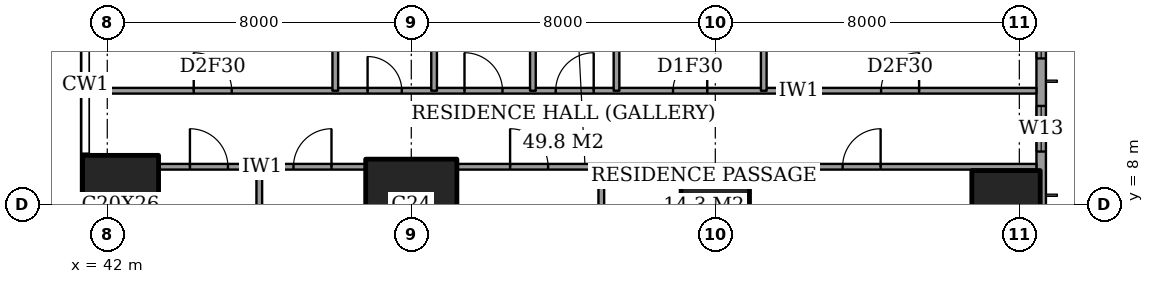
"""IFC4 building model, lengths in metres.
Left out: names, types, materials, properties, quantities, classifications, styles, units other than length and angle.
Written with IfcOpenShell. Run it as: python <this file> out.ifc"""

import sys

from ifc_helpers import new_model, si_unit, direction, frame, frame_2d, origin, origin_2d, place, context, subcontext, project, spatial, rectangle, extrude, element, fill, save


model = new_model("IFC4")
c1 = context("Model", 3, precision=1e-05, world=origin(), true_north=direction((0.0, 1.0)))
c2 = subcontext(c1, "Body", "Model", "MODEL_VIEW")
j1 = project(units=[si_unit("LENGTHUNIT", "METRE"), si_unit("PLANEANGLEUNIT", "RADIAN")], contexts=[c1])
p1 = place(None, origin())
s1 = spatial("IfcSite", under=j1, at=p1, CompositionType="ELEMENT")
p2 = place(p1, origin())
s2 = spatial("IfcBuilding", under=s1, at=p2, CompositionType="ELEMENT")
p3 = place(p2, frame((0.0, 0.0, 218.2)))
s3 = spatial("IfcBuildingStorey", under=s2, at=p3, CompositionType="ELEMENT", Elevation=218.2)
p4 = place(p3, frame((42.35, 8.0, 0.0), z_axis=(0.0, 0.0, 1.0), x_axis=(1.0, 0.0, 0.0)))
e1 = element("IfcColumn", 1, at=p4, inside=s3, PredefinedType="COLUMN", context=c2, shape_type="SweptSolid", body=[
    extrude(rectangle(XDim=2.0, YDim=2.6, at=origin_2d()), origin(), (0.0, 0.0, 1.0), 3.6),
])
p5 = place(p3, frame((50.0, 8.0, 0.0), z_axis=(0.0, 0.0, 1.0), x_axis=(1.0, 0.0, 0.0)))
e2 = element("IfcColumn", 2, at=p5, inside=s3, PredefinedType="COLUMN", context=c2, shape_type="SweptSolid", body=[
    extrude(rectangle(XDim=2.4, YDim=2.4, at=origin_2d()), origin(), (0.0, 0.0, 1.0), 3.6),
])
for number, where, z_axis, x_axis in (
    (3, (58.0, 8.0, 0.0), (0.0, 0.0, 1.0), (1.0, 0.0, 0.0)),
    (4, (65.65, 8.0, 0.0), (0.0, 0.0, 1.0), (1.0, 0.0, 0.0)),
):
    element("IfcColumn", number, at=place(p3, frame(where, z_axis=z_axis, x_axis=x_axis)), inside=s3, PredefinedType="COLUMN", context=c2, shape_type="SweptSolid", body=[
        extrude(rectangle(XDim=1.8, YDim=1.8, at=origin_2d()), origin(), (0.0, 0.0, 1.0), 3.6),
    ])
p6 = place(p3, frame((66.575, 3.175, 0.0), z_axis=(0.0, 0.0, 1.0), x_axis=(0.0, 1.0, 0.0)))
e5 = element("IfcWall", 5, at=p6, inside=s3, PredefinedType="SOLIDWALL", context=c2, shape_type="SweptSolid", body=[
    extrude(rectangle(XDim=41.65, YDim=0.25, at=frame_2d((20.825, 0.0))), origin(), (0.0, 0.0, 1.0), 3.6),
])
p7 = place(p6, frame((0.825, 0.0, 0.2)))
e6 = element("IfcOpeningElement", 6, at=p7, cuts=e5, PredefinedType="OPENING", context=c2, shape_type="SweptSolid", body=[
    extrude(rectangle(XDim=2.4, YDim=2.4, at=frame_2d((1.2, 1.2))), frame((0.0, 0.135, 0.0), z_axis=(0.0, -1.0, 0.0), x_axis=(1.0, 0.0, 0.0)), (0.0, 0.0, 1.0), 0.27),
])
p8 = place(p6, frame((6.225, 0.0, 0.2)))
e7 = element("IfcOpeningElement", 7, at=p8, cuts=e5, PredefinedType="OPENING", context=c2, shape_type="SweptSolid", body=[
    extrude(rectangle(XDim=1.2, YDim=2.4, at=frame_2d((0.6, 1.2))), frame((0.0, 0.135, 0.0), z_axis=(0.0, -1.0, 0.0), x_axis=(1.0, 0.0, 0.0)), (0.0, 0.0, 1.0), 0.27),
])
p9 = place(p6, frame((8.675, 0.0, 0.2)))
e8 = element("IfcOpeningElement", 8, at=p9, cuts=e5, PredefinedType="OPENING", context=c2, shape_type="SweptSolid", body=[
    extrude(rectangle(XDim=2.4, YDim=2.4, at=frame_2d((1.2, 1.2))), frame((0.0, 0.135, 0.0), z_axis=(0.0, -1.0, 0.0), x_axis=(1.0, 0.0, 0.0)), (0.0, 0.0, 1.0), 0.27),
])
p10 = place(p6, frame((15.675, 0.0, 0.2)))
e9 = element("IfcOpeningElement", 9, at=p10, cuts=e5, PredefinedType="OPENING", context=c2, shape_type="SweptSolid", body=[
    extrude(rectangle(XDim=2.4, YDim=2.4, at=frame_2d((1.2, 1.2))), frame((0.0, 0.135, 0.0), z_axis=(0.0, -1.0, 0.0), x_axis=(1.0, 0.0, 0.0)), (0.0, 0.0, 1.0), 0.27),
])
p11 = place(p6, frame((23.575, 0.0, 0.2)))
e10 = element("IfcOpeningElement", 10, at=p11, cuts=e5, PredefinedType="OPENING", context=c2, shape_type="SweptSolid", body=[
    extrude(rectangle(XDim=2.4, YDim=2.4, at=frame_2d((1.2, 1.2))), frame((0.0, 0.135, 0.0), z_axis=(0.0, -1.0, 0.0), x_axis=(1.0, 0.0, 0.0)), (0.0, 0.0, 1.0), 0.27),
])
p12 = place(p6, frame((30.775, 0.0, 0.2)))
e11 = element("IfcOpeningElement", 11, at=p12, cuts=e5, PredefinedType="OPENING", context=c2, shape_type="SweptSolid", body=[
    extrude(rectangle(XDim=2.4, YDim=2.4, at=frame_2d((1.2, 1.2))), frame((0.0, 0.135, 0.0), z_axis=(0.0, -1.0, 0.0), x_axis=(1.0, 0.0, 0.0)), (0.0, 0.0, 1.0), 0.27),
])
p13 = place(p6, frame((34.55, 0.0, 0.2)))
e12 = element("IfcOpeningElement", 12, at=p13, cuts=e5, PredefinedType="OPENING", context=c2, shape_type="SweptSolid", body=[
    extrude(rectangle(XDim=1.2, YDim=2.4, at=frame_2d((0.6, 1.2))), frame((0.0, 0.135, 0.0), z_axis=(0.0, -1.0, 0.0), x_axis=(1.0, 0.0, 0.0)), (0.0, 0.0, 1.0), 0.27),
])
p14 = place(p6, frame((38.425, 0.0, 0.2)))
e13 = element("IfcOpeningElement", 13, at=p14, cuts=e5, PredefinedType="OPENING", context=c2, shape_type="SweptSolid", body=[
    extrude(rectangle(XDim=2.4, YDim=2.4, at=frame_2d((1.2, 1.2))), frame((0.0, 0.135, 0.0), z_axis=(0.0, -1.0, 0.0), x_axis=(1.0, 0.0, 0.0)), (0.0, 0.0, 1.0), 0.27),
])
p15 = place(p3, frame((43.35, 9.0, 0.0), z_axis=(0.0, 0.0, 1.0), x_axis=(1.0, 0.0, 0.0)))
e14 = element("IfcWall", 14, at=p15, inside=s3, PredefinedType="PARTITIONING", context=c2, shape_type="SweptSolid", body=[
    extrude(rectangle(XDim=5.45, YDim=0.15, at=frame_2d((2.725, 0.0))), origin(), (0.0, 0.0, 1.0), 3.35),
])
p16 = place(p15, frame((3.55, 0.0, 0.0)))
e15 = element("IfcOpeningElement", 15, at=p16, cuts=e14, PredefinedType="OPENING", context=c2, shape_type="SweptSolid", body=[
    extrude(rectangle(XDim=1.0, YDim=2.1, at=frame_2d((0.5, 1.05))), frame((0.0, 0.085, 0.0), z_axis=(0.0, -1.0, 0.0), x_axis=(1.0, 0.0, 0.0)), (0.0, 0.0, 1.0), 0.17),
])
p17 = place(p15, frame((0.825, 0.0, 0.0)))
e16 = element("IfcOpeningElement", 16, at=p17, cuts=e14, PredefinedType="OPENING", context=c2, shape_type="SweptSolid", body=[
    extrude(rectangle(XDim=1.0, YDim=2.1, at=frame_2d((0.5, 1.05))), frame((0.0, 0.085, 0.0), z_axis=(0.0, -1.0, 0.0), x_axis=(1.0, 0.0, 0.0)), (0.0, 0.0, 1.0), 0.17),
])
p18 = place(p3, frame((51.2, 9.0, 0.0), z_axis=(0.0, 0.0, 1.0), x_axis=(1.0, 0.0, 0.0)))
e17 = element("IfcWall", 17, at=p18, inside=s3, PredefinedType="PARTITIONING", context=c2, shape_type="SweptSolid", body=[
    extrude(rectangle(XDim=15.25, YDim=0.15, at=frame_2d((7.625, 0.0))), origin(), (0.0, 0.0, 1.0), 3.35),
])
p19 = place(p18, frame((10.15, 0.0, 0.0)))
e18 = element("IfcOpeningElement", 18, at=p19, cuts=e17, PredefinedType="OPENING", context=c2, shape_type="SweptSolid", body=[
    extrude(rectangle(XDim=1.0, YDim=2.1, at=frame_2d((0.5, 1.05))), frame((0.0, 0.085, 0.0), z_axis=(0.0, -1.0, 0.0), x_axis=(1.0, 0.0, 0.0)), (0.0, 0.0, 1.0), 0.17),
])
p20 = place(p18, frame((1.4, 0.0, 0.0)))
e19 = element("IfcOpeningElement", 19, at=p20, cuts=e17, PredefinedType="OPENING", context=c2, shape_type="SweptSolid", body=[
    extrude(rectangle(XDim=1.0, YDim=2.1, at=frame_2d((0.5, 1.05))), frame((0.0, 0.085, 0.0), z_axis=(0.0, -1.0, 0.0), x_axis=(1.0, 0.0, 0.0)), (0.0, 0.0, 1.0), 0.17),
])
p21 = place(p3, frame((41.439, 11.0, 0.0), z_axis=(0.0, 0.0, 1.0), x_axis=(1.0, 0.0, 0.0)))
e20 = element("IfcWall", 20, at=p21, inside=s3, PredefinedType="PARTITIONING", context=c2, shape_type="SweptSolid", body=[
    extrude(rectangle(XDim=25.011, YDim=0.15, at=frame_2d((12.505, 0.0))), origin(), (0.0, 0.0, 1.0), 3.35),
])
p22 = place(p21, frame((12.361, 0.0, 0.0)))
e21 = element("IfcOpeningElement", 21, at=p22, cuts=e20, PredefinedType="OPENING", context=c2, shape_type="SweptSolid", body=[
    extrude(rectangle(XDim=1.0, YDim=2.1, at=frame_2d((0.5, 1.05))), frame((0.0, 0.085, 0.0), z_axis=(0.0, -1.0, 0.0), x_axis=(1.0, 0.0, 0.0)), (0.0, 0.0, 1.0), 0.17),
])
p23 = place(p21, frame((20.924, 0.0, 0.0)))
e22 = element("IfcOpeningElement", 22, at=p23, cuts=e20, PredefinedType="OPENING", context=c2, shape_type="SweptSolid", body=[
    extrude(rectangle(XDim=1.0, YDim=2.1, at=frame_2d((0.5, 1.05))), frame((0.0, 0.085, 0.0), z_axis=(0.0, -1.0, 0.0), x_axis=(1.0, 0.0, 0.0)), (0.0, 0.0, 1.0), 0.17),
])
p24 = place(p21, frame((15.448, 0.0, 0.0)))
e23 = element("IfcOpeningElement", 23, at=p24, cuts=e20, PredefinedType="OPENING", context=c2, shape_type="SweptSolid", body=[
    extrude(rectangle(XDim=0.9, YDim=2.1, at=frame_2d((0.45, 1.05))), frame((0.0, 0.085, 0.0), z_axis=(0.0, -1.0, 0.0), x_axis=(1.0, 0.0, 0.0)), (0.0, 0.0, 1.0), 0.17),
])
p25 = place(p21, frame((9.961, 0.0, 0.0)))
e24 = element("IfcOpeningElement", 24, at=p25, cuts=e20, PredefinedType="OPENING", context=c2, shape_type="SweptSolid", body=[
    extrude(rectangle(XDim=1.0, YDim=2.1, at=frame_2d((0.5, 1.05))), frame((0.0, 0.085, 0.0), z_axis=(0.0, -1.0, 0.0), x_axis=(1.0, 0.0, 0.0)), (0.0, 0.0, 1.0), 0.17),
])
p26 = place(p21, frame((7.411, 0.0, 0.0)))
e25 = element("IfcOpeningElement", 25, at=p26, cuts=e20, PredefinedType="OPENING", context=c2, shape_type="SweptSolid", body=[
    extrude(rectangle(XDim=0.9, YDim=2.1, at=frame_2d((0.45, 1.05))), frame((0.0, 0.085, 0.0), z_axis=(0.0, -1.0, 0.0), x_axis=(1.0, 0.0, 0.0)), (0.0, 0.0, 1.0), 0.17),
])
p27 = place(p21, frame((2.836, 0.0, 0.0)))
e26 = element("IfcOpeningElement", 26, at=p27, cuts=e20, PredefinedType="OPENING", context=c2, shape_type="SweptSolid", body=[
    extrude(rectangle(XDim=1.0, YDim=2.1, at=frame_2d((0.5, 1.05))), frame((0.0, 0.085, 0.0), z_axis=(0.0, -1.0, 0.0), x_axis=(1.0, 0.0, 0.0)), (0.0, 0.0, 1.0), 0.17),
])
p28 = place(p3, frame((46.0, -0.45, 0.0), z_axis=(0.0, 0.0, 1.0), x_axis=(0.0, 1.0, 0.0)))
e27 = element("IfcWall", 27, at=p28, inside=s3, PredefinedType="PARTITIONING", context=c2, shape_type="SweptSolid", body=[
    extrude(rectangle(XDim=9.45, YDim=0.15, at=frame_2d((4.725, 0.0))), origin(), (0.0, 0.0, 1.0), 3.35),
])
p29 = place(p3, frame((48.0, 11.0, 0.0), z_axis=(0.0, 0.0, 1.0), x_axis=(0.0, 1.0, 0.0)))
e28 = element("IfcWall", 28, at=p29, inside=s3, PredefinedType="PARTITIONING", context=c2, shape_type="SweptSolid", body=[
    extrude(rectangle(XDim=6.5, YDim=0.15, at=frame_2d((3.25, 0.0))), origin(), (0.0, 0.0, 1.0), 3.35),
])
p30 = place(p3, frame((50.6, 11.0, 0.0), z_axis=(0.0, 0.0, 1.0), x_axis=(0.0, 1.0, 0.0)))
e29 = element("IfcWall", 29, at=p30, inside=s3, PredefinedType="PARTITIONING", context=c2, shape_type="SweptSolid", body=[
    extrude(rectangle(XDim=3.8, YDim=0.15, at=frame_2d((1.9, 0.0))), origin(), (0.0, 0.0, 1.0), 3.35),
])
p31 = place(p3, frame((53.2, 11.0, 0.0), z_axis=(0.0, 0.0, 1.0), x_axis=(0.0, 1.0, 0.0)))
e30 = element("IfcWall", 30, at=p31, inside=s3, PredefinedType="PARTITIONING", context=c2, shape_type="SweptSolid", body=[
    extrude(rectangle(XDim=6.5, YDim=0.15, at=frame_2d((3.25, 0.0))), origin(), (0.0, 0.0, 1.0), 3.35),
])
p32 = place(p3, frame((55.0, -0.45, 0.0), z_axis=(0.0, 0.0, 1.0), x_axis=(0.0, 1.0, 0.0)))
e31 = element("IfcWall", 31, at=p32, inside=s3, PredefinedType="PARTITIONING", context=c2, shape_type="SweptSolid", body=[
    extrude(rectangle(XDim=9.45, YDim=0.15, at=frame_2d((4.725, 0.0))), origin(), (0.0, 0.0, 1.0), 3.35),
])
p33 = place(p3, frame((55.4, 11.0, 0.0), z_axis=(0.0, 0.0, 1.0), x_axis=(0.0, 1.0, 0.0)))
e32 = element("IfcWall", 32, at=p33, inside=s3, PredefinedType="PARTITIONING", context=c2, shape_type="SweptSolid", body=[
    extrude(rectangle(XDim=10.6, YDim=0.15, at=frame_2d((5.3, 0.0))), origin(), (0.0, 0.0, 1.0), 3.35),
])
p34 = place(p33, frame((8.05, 0.0, 0.0)))
e33 = element("IfcOpeningElement", 33, at=p34, cuts=e32, PredefinedType="OPENING", context=c2, shape_type="SweptSolid", body=[
    extrude(rectangle(XDim=1.0, YDim=2.1, at=frame_2d((0.5, 1.05))), frame((0.0, 0.085, 0.0), z_axis=(0.0, -1.0, 0.0), x_axis=(1.0, 0.0, 0.0)), (0.0, 0.0, 1.0), 0.17),
])
p35 = place(p3, frame((59.275, 11.0, 0.0), z_axis=(0.0, 0.0, 1.0), x_axis=(0.0, 1.0, 0.0)))
e34 = element("IfcWall", 34, at=p35, inside=s3, PredefinedType="PARTITIONING", context=c2, shape_type="SweptSolid", body=[
    extrude(rectangle(XDim=3.8, YDim=0.15, at=frame_2d((1.9, 0.0))), origin(), (0.0, 0.0, 1.0), 3.35),
])
p36 = place(p8, origin())
e35 = element("IfcWindow", 35, at=p36, inside=s3, PartitioningType="SINGLE_PANEL", PredefinedType="WINDOW", context=c2, shape_type="SweptSolid", body=[
    extrude(rectangle(XDim=1.2, YDim=2.4, at=frame_2d((0.6, 1.2))), frame((0.0, 0.03, 0.0), z_axis=(0.0, -1.0, 0.0), x_axis=(1.0, 0.0, 0.0)), (0.0, 0.0, 1.0), 0.06),
])
fill(e7, e35)
p37 = place(p9, origin())
e36 = element("IfcWindow", 36, at=p37, inside=s3, PartitioningType="SINGLE_PANEL", PredefinedType="WINDOW", context=c2, shape_type="SweptSolid", body=[
    extrude(rectangle(XDim=2.4, YDim=2.4, at=frame_2d((1.2, 1.2))), frame((0.0, 0.03, 0.0), z_axis=(0.0, -1.0, 0.0), x_axis=(1.0, 0.0, 0.0)), (0.0, 0.0, 1.0), 0.06),
])
fill(e8, e36)
p38 = place(p19, origin())
e37 = element("IfcDoor", 37, at=p38, inside=s3, OperationType="SINGLE_SWING_LEFT", PredefinedType="DOOR", context=c2, shape_type="SweptSolid", body=[
    extrude(rectangle(XDim=1.0, YDim=2.1, at=frame_2d((0.5, 1.05))), frame((0.0, 0.025, 0.0), z_axis=(0.0, -1.0, 0.0), x_axis=(1.0, 0.0, 0.0)), (0.0, 0.0, 1.0), 0.05),
])
fill(e18, e37)
p39 = place(p20, origin())
e38 = element("IfcDoor", 38, at=p39, inside=s3, OperationType="SINGLE_SWING_RIGHT", PredefinedType="DOOR", context=c2, shape_type="SweptSolid", body=[
    extrude(rectangle(XDim=1.0, YDim=2.1, at=frame_2d((0.5, 1.05))), frame((0.0, 0.025, 0.0), z_axis=(0.0, -1.0, 0.0), x_axis=(1.0, 0.0, 0.0)), (0.0, 0.0, 1.0), 0.05),
])
fill(e19, e38)
p40 = place(p16, origin())
e39 = element("IfcDoor", 39, at=p40, inside=s3, OperationType="SINGLE_SWING_LEFT", PredefinedType="DOOR", context=c2, shape_type="SweptSolid", body=[
    extrude(rectangle(XDim=1.0, YDim=2.1, at=frame_2d((0.5, 1.05))), frame((0.0, 0.025, 0.0), z_axis=(0.0, -1.0, 0.0), x_axis=(1.0, 0.0, 0.0)), (0.0, 0.0, 1.0), 0.05),
])
fill(e15, e39)
p41 = place(p17, origin())
e40 = element("IfcDoor", 40, at=p41, inside=s3, OperationType="SINGLE_SWING_RIGHT", PredefinedType="DOOR", context=c2, shape_type="SweptSolid", body=[
    extrude(rectangle(XDim=1.0, YDim=2.1, at=frame_2d((0.5, 1.05))), frame((0.0, 0.025, 0.0), z_axis=(0.0, -1.0, 0.0), x_axis=(1.0, 0.0, 0.0)), (0.0, 0.0, 1.0), 0.05),
])
fill(e16, e40)
p42 = place(p22, origin())
e41 = element("IfcDoor", 41, at=p42, inside=s3, OperationType="SINGLE_SWING_LEFT", PredefinedType="DOOR", context=c2, shape_type="SweptSolid", body=[
    extrude(rectangle(XDim=1.0, YDim=2.1, at=frame_2d((0.5, 1.05))), frame((0.0, 0.025, 0.0), z_axis=(0.0, -1.0, 0.0), x_axis=(1.0, 0.0, 0.0)), (0.0, 0.0, 1.0), 0.05),
])
fill(e21, e41)
p43 = place(p23, origin())
e42 = element("IfcDoor", 42, at=p43, inside=s3, OperationType="SINGLE_SWING_LEFT", PredefinedType="DOOR", context=c2, shape_type="SweptSolid", body=[
    extrude(rectangle(XDim=1.0, YDim=2.1, at=frame_2d((0.5, 1.05))), frame((0.0, 0.025, 0.0), z_axis=(0.0, -1.0, 0.0), x_axis=(1.0, 0.0, 0.0)), (0.0, 0.0, 1.0), 0.05),
])
fill(e22, e42)
p44 = place(p24, origin())
e43 = element("IfcDoor", 43, at=p44, inside=s3, OperationType="SINGLE_SWING_LEFT", PredefinedType="DOOR", context=c2, shape_type="SweptSolid", body=[
    extrude(rectangle(XDim=0.9, YDim=2.1, at=frame_2d((0.45, 1.05))), frame((0.0, 0.025, 0.0), z_axis=(0.0, -1.0, 0.0), x_axis=(1.0, 0.0, 0.0)), (0.0, 0.0, 1.0), 0.05),
])
fill(e23, e43)
p45 = place(p25, origin())
e44 = element("IfcDoor", 44, at=p45, inside=s3, OperationType="SINGLE_SWING_RIGHT", PredefinedType="DOOR", context=c2, shape_type="SweptSolid", body=[
    extrude(rectangle(XDim=1.0, YDim=2.1, at=frame_2d((0.5, 1.05))), frame((0.0, 0.025, 0.0), z_axis=(0.0, -1.0, 0.0), x_axis=(1.0, 0.0, 0.0)), (0.0, 0.0, 1.0), 0.05),
])
fill(e24, e44)
p46 = place(p26, origin())
e45 = element("IfcDoor", 45, at=p46, inside=s3, OperationType="SINGLE_SWING_RIGHT", PredefinedType="DOOR", context=c2, shape_type="SweptSolid", body=[
    extrude(rectangle(XDim=0.9, YDim=2.1, at=frame_2d((0.45, 1.05))), frame((0.0, 0.025, 0.0), z_axis=(0.0, -1.0, 0.0), x_axis=(1.0, 0.0, 0.0)), (0.0, 0.0, 1.0), 0.05),
])
fill(e25, e45)
p47 = place(p27, origin())
e46 = element("IfcDoor", 46, at=p47, inside=s3, OperationType="SINGLE_SWING_RIGHT", PredefinedType="DOOR", context=c2, shape_type="SweptSolid", body=[
    extrude(rectangle(XDim=1.0, YDim=2.1, at=frame_2d((0.5, 1.05))), frame((0.0, 0.025, 0.0), z_axis=(0.0, -1.0, 0.0), x_axis=(1.0, 0.0, 0.0)), (0.0, 0.0, 1.0), 0.05),
])
fill(e26, e46)
save(model, sys.argv[1])
